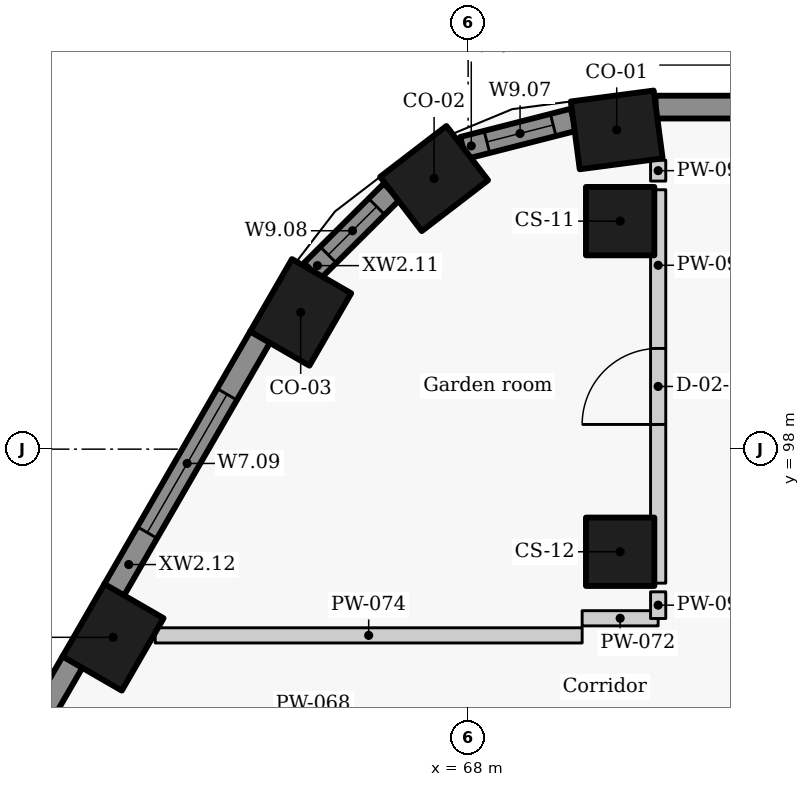
"""IFC4 building model, lengths in metres.
Left out: names, types, materials, properties, quantities, classifications, styles, units other than length and angle.
Written with IfcOpenShell. Run it as: python <this file> out.ifc"""

import sys

from ifc_helpers import new_model, si_unit, direction, frame, frame_2d, origin, origin_2d, place, context, subcontext, project, spatial, rectangle, extrude, element, fill, save


model = new_model("IFC4")
c1 = context("Model", 3, precision=1e-05, world=origin(), true_north=direction((0.0, 1.0)))
c2 = subcontext(c1, "Body", "Model", "MODEL_VIEW")
j1 = project(units=[si_unit("LENGTHUNIT", "METRE"), si_unit("PLANEANGLEUNIT", "RADIAN")], contexts=[c1])
p1 = place(None, origin())
s1 = spatial("IfcSite", under=j1, at=p1, CompositionType="ELEMENT")
p2 = place(p1, origin())
s2 = spatial("IfcBuilding", under=s1, at=p2, CompositionType="ELEMENT")
p3 = place(p2, frame((0.0, 0.0, 259.2)))
s3 = spatial("IfcBuildingStorey", under=s2, at=p3, CompositionType="ELEMENT", Elevation=259.2)
for number, where, z_axis, x_axis in (
    (1, (69.955, 102.2, 0.0), (0.0, 0.0, 1.0), (-0.991, -0.131, 0.0)),
    (2, (67.552, 101.56, 0.0), (0.0, 0.0, 1.0), (-0.793, -0.609, 0.0)),
    (3, (65.797, 99.8, 0.0), (0.0, 0.0, 1.0), (-0.5, -0.866, 0.0)),
    (4, (63.329, 95.525, 0.0), (0.0, 0.0, 1.0), (-0.5, -0.866, 0.0)),
):
    element("IfcColumn", number, at=place(p3, frame(where, z_axis=z_axis, x_axis=x_axis)), inside=s3, PredefinedType="COLUMN", context=c2, shape_type="SweptSolid", body=[
        extrude(rectangle(XDim=1.1, YDim=0.9, at=origin_2d()), origin(), (0.0, 0.0, 1.0), 3.3),
    ])
for number, where, z_axis, x_axis in (
    (5, (70.0, 101.0, 0.0), (0.0, 0.0, 1.0), (0.0, -1.0, 0.0)),
    (6, (70.0, 96.65, 0.0), (0.0, 0.0, 1.0), (0.0, -1.0, 0.0)),
):
    element("IfcColumn", number, at=place(p3, frame(where, z_axis=z_axis, x_axis=x_axis)), inside=s3, PredefinedType="COLUMN", context=c2, shape_type="SweptSolid", body=[
        extrude(rectangle(XDim=0.9, YDim=0.9, at=origin_2d()), origin(), (0.0, 0.0, 1.0), 3.3),
    ])
p4 = place(p3, frame((89.499, 102.5, 0.0), z_axis=(0.0, 0.0, 1.0), x_axis=(-1.0, 0.0, 0.0)))
e7 = element("IfcWall", 7, at=p4, inside=s3, PredefinedType="SOLIDWALL", context=c2, shape_type="SweptSolid", body=[
    extrude(rectangle(XDim=19.033, YDim=0.3, at=frame_2d((9.517, 0.0))), origin(), (0.0, 0.0, 1.0), 2.425),
])
p5 = place(p3, frame((69.386, 102.333, 0.0), z_axis=(0.0, 0.0, 1.0), x_axis=(-0.968895303033, -0.247470991757, 0.0)))
e8 = element("IfcWall", 8, at=p5, inside=s3, PredefinedType="SOLIDWALL", context=c2, shape_type="SweptSolid", body=[
    extrude(rectangle(XDim=1.5, YDim=0.3, at=frame_2d((0.75, 0.0))), origin(), (0.0, 0.0, 1.0), 2.425),
])
p6 = place(p5, frame((0.276, 0.0, 0.9)))
e9 = element("IfcOpeningElement", 9, at=p6, cuts=e8, PredefinedType="OPENING", context=c2, shape_type="SweptSolid", body=[
    extrude(rectangle(XDim=0.9, YDim=1.1, at=frame_2d((0.45, 0.55))), frame((0.0, 0.16, 0.0), z_axis=(0.0, -1.0, 0.0), x_axis=(1.0, 0.0, 0.0)), (0.0, 0.0, 1.0), 0.32),
])
p7 = place(p3, frame((66.996, 101.388, 0.0), z_axis=(0.0, 0.0, 1.0), x_axis=(-0.708589353117, -0.705621094249, 0.0)))
e10 = element("IfcWall", 10, at=p7, inside=s3, PredefinedType="SOLIDWALL", context=c2, shape_type="SweptSolid", body=[
    extrude(rectangle(XDim=1.48, YDim=0.3, at=frame_2d((0.74, 0.0))), origin(), (0.0, 0.0, 1.0), 2.425),
])
p8 = place(p7, frame((0.28, 0.0, 0.9)))
e11 = element("IfcOpeningElement", 11, at=p8, cuts=e10, PredefinedType="OPENING", context=c2, shape_type="SweptSolid", body=[
    extrude(rectangle(XDim=0.9, YDim=1.1, at=frame_2d((0.45, 0.55))), frame((0.0, 0.16, 0.0), z_axis=(0.0, -1.0, 0.0), x_axis=(1.0, 0.0, 0.0)), (0.0, 0.0, 1.0), 0.32),
])
p9 = place(p3, frame((65.264, 99.477, 0.0), z_axis=(0.0, 0.0, 1.0), x_axis=(-0.499984490703, -0.866034357896, 0.0)))
e12 = element("IfcWall", 12, at=p9, inside=s3, PredefinedType="SOLIDWALL", context=c2, shape_type="SweptSolid", body=[
    extrude(rectangle(XDim=3.844, YDim=0.3, at=frame_2d((1.922, 0.0))), origin(), (0.0, 0.0, 1.0), 2.425),
])
p10 = place(p9, frame((0.872, 0.0, 0.9)))
e13 = element("IfcOpeningElement", 13, at=p10, cuts=e12, PredefinedType="OPENING", context=c2, shape_type="SweptSolid", body=[
    extrude(rectangle(XDim=2.1, YDim=1.1, at=frame_2d((1.05, 0.55))), frame((0.0, 0.16, 0.0), z_axis=(0.0, -1.0, 0.0), x_axis=(1.0, 0.0, 0.0)), (0.0, 0.0, 1.0), 0.32),
])
p11 = place(p3, frame((62.796, 95.202, 0.0), z_axis=(0.0, 0.0, 1.0), x_axis=(-0.499984490703, -0.866034357896, 0.0)))
e14 = element("IfcWall", 14, at=p11, inside=s3, PredefinedType="SOLIDWALL", context=c2, shape_type="SweptSolid", body=[
    extrude(rectangle(XDim=3.844, YDim=0.3, at=frame_2d((1.922, 0.0))), origin(), (0.0, 0.0, 1.0), 2.425),
])
p12 = place(p11, frame((1.661, 0.0, 0.9)))
e15 = element("IfcOpeningElement", 15, at=p12, cuts=e14, PredefinedType="OPENING", context=c2, shape_type="SweptSolid", body=[
    extrude(rectangle(XDim=1.5, YDim=1.1, at=frame_2d((0.75, 0.55))), frame((0.0, 0.16, 0.0), z_axis=(0.0, -1.0, 0.0), x_axis=(1.0, 0.0, 0.0)), (0.0, 0.0, 1.0), 0.32),
])
p13 = place(p3, frame((69.5, 95.775, 0.0), z_axis=(0.0, 0.0, 1.0), x_axis=(1.0, 0.0, 0.0)))
e16 = element("IfcWall", 16, at=p13, inside=s3, PredefinedType="PARTITIONING", context=c2, shape_type="SweptSolid", body=[
    extrude(rectangle(XDim=1.0, YDim=0.2, at=frame_2d((0.5, 0.0))), origin(), (0.0, 0.0, 1.0), 2.505),
])
p14 = place(p3, frame((63.883, 95.55, 0.0), z_axis=(0.0, 0.0, 1.0), x_axis=(1.0, 0.0, 0.0)))
e17 = element("IfcWall", 17, at=p14, inside=s3, PredefinedType="PARTITIONING", context=c2, shape_type="SweptSolid", body=[
    extrude(rectangle(XDim=5.617, YDim=0.2, at=frame_2d((2.808, 0.0))), origin(), (0.0, 0.0, 1.0), 3.025),
])
p15 = place(p3, frame((70.5, 95.772, 0.0), z_axis=(0.0, 0.0, 1.0), x_axis=(0.0, 1.0, 0.0)))
e18 = element("IfcWall", 18, at=p15, inside=s3, PredefinedType="PARTITIONING", context=c2, shape_type="SweptSolid", body=[
    extrude(rectangle(XDim=0.351, YDim=0.2, at=frame_2d((0.176, 0.0))), origin(), (0.0, 0.0, 1.0), 3.025),
])
p16 = place(p3, frame((70.5, 96.237, 0.0), z_axis=(0.0, 0.0, 1.0), x_axis=(0.0, 1.0, 0.0)))
e19 = element("IfcWall", 19, at=p16, inside=s3, PredefinedType="PARTITIONING", context=c2, shape_type="SweptSolid", body=[
    extrude(rectangle(XDim=5.176, YDim=0.2, at=frame_2d((2.588, 0.0))), origin(), (0.0, 0.0, 1.0), 3.025),
])
p17 = place(p16, frame((2.088, 0.0, 0.0)))
e20 = element("IfcOpeningElement", 20, at=p17, cuts=e19, PredefinedType="OPENING", context=c2, shape_type="SweptSolid", body=[
    extrude(rectangle(XDim=1.0, YDim=2.1, at=frame_2d((0.5, 1.05))), frame((0.0, 0.11, 0.0), z_axis=(0.0, -1.0, 0.0), x_axis=(1.0, 0.0, 0.0)), (0.0, 0.0, 1.0), 0.22),
])
p18 = place(p3, frame((70.5, 101.527, 0.0), z_axis=(0.0, 0.0, 1.0), x_axis=(0.0, 1.0, 0.0)))
e21 = element("IfcWall", 21, at=p18, inside=s3, PredefinedType="PARTITIONING", context=c2, shape_type="SweptSolid", body=[
    extrude(rectangle(XDim=0.274, YDim=0.2, at=frame_2d((0.137, 0.0))), origin(), (0.0, 0.0, 1.0), 3.025),
])
p19 = place(p6, origin())
e22 = element("IfcWindow", 22, at=p19, inside=s3, PartitioningType="SINGLE_PANEL", PredefinedType="WINDOW", context=c2, shape_type="SweptSolid", body=[
    extrude(rectangle(XDim=0.9, YDim=1.1, at=frame_2d((0.45, 0.55))), frame((0.0, 0.03, 0.0), z_axis=(0.0, -1.0, 0.0), x_axis=(1.0, 0.0, 0.0)), (0.0, 0.0, 1.0), 0.06),
])
fill(e9, e22)
p20 = place(p8, origin())
e23 = element("IfcWindow", 23, at=p20, inside=s3, PartitioningType="SINGLE_PANEL", PredefinedType="WINDOW", context=c2, shape_type="SweptSolid", body=[
    extrude(rectangle(XDim=0.9, YDim=1.1, at=frame_2d((0.45, 0.55))), frame((0.0, 0.03, 0.0), z_axis=(0.0, -1.0, 0.0), x_axis=(1.0, 0.0, 0.0)), (0.0, 0.0, 1.0), 0.06),
])
fill(e11, e23)
p21 = place(p10, origin())
e24 = element("IfcWindow", 24, at=p21, inside=s3, PartitioningType="SINGLE_PANEL", PredefinedType="WINDOW", context=c2, shape_type="SweptSolid", body=[
    extrude(rectangle(XDim=2.1, YDim=1.1, at=frame_2d((1.05, 0.55))), frame((0.0, 0.03, 0.0), z_axis=(0.0, -1.0, 0.0), x_axis=(1.0, 0.0, 0.0)), (0.0, 0.0, 1.0), 0.06),
])
fill(e13, e24)
p22 = place(p17, origin())
e25 = element("IfcDoor", 25, at=p22, inside=s3, OperationType="SINGLE_SWING_LEFT", PredefinedType="DOOR", context=c2, shape_type="SweptSolid", body=[
    extrude(rectangle(XDim=1.0, YDim=2.1, at=frame_2d((0.5, 1.05))), frame((0.0, 0.025, 0.0), z_axis=(0.0, -1.0, 0.0), x_axis=(1.0, 0.0, 0.0)), (0.0, 0.0, 1.0), 0.05),
])
fill(e20, e25)
save(model, sys.argv[1])
